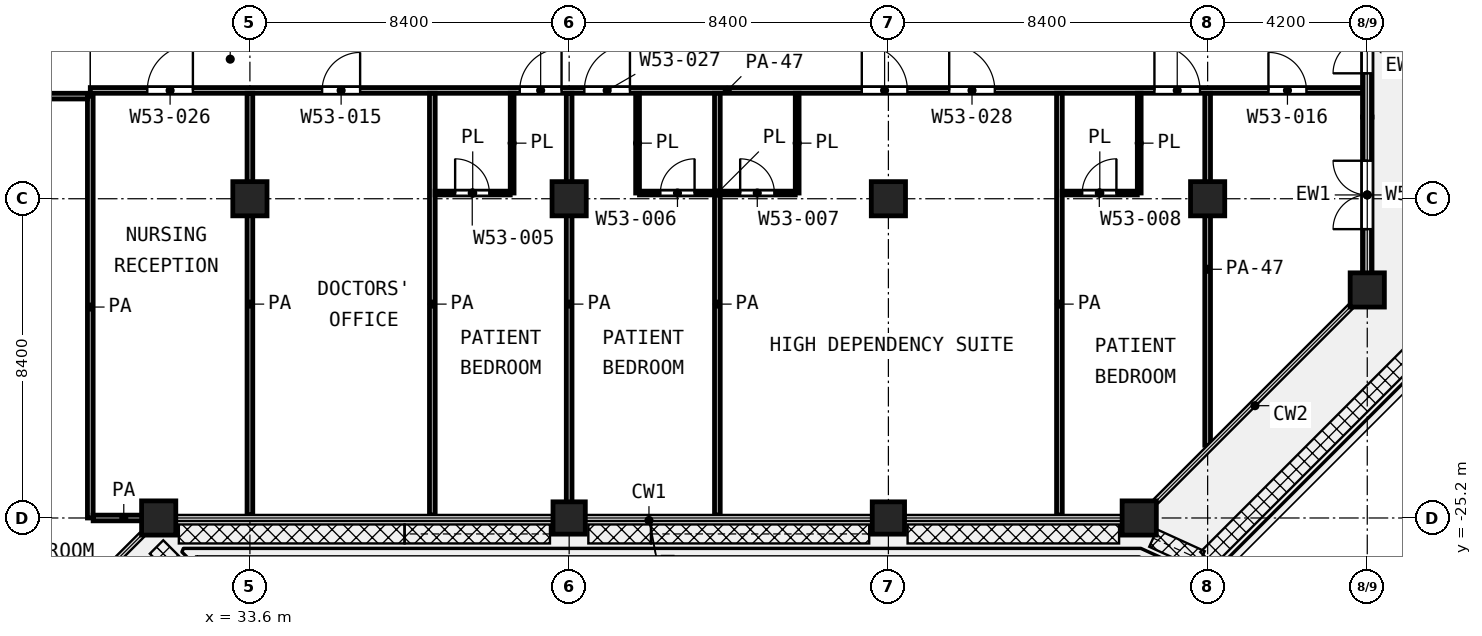
"""IFC4 building model, lengths in metres.
Left out: names, types, materials, properties, quantities, classifications, styles, units other than length and angle.
Written with IfcOpenShell. Run it as: python <this file> out.ifc"""

import sys

from ifc_helpers import new_model, si_unit, direction, frame, frame_2d, origin, origin_2d, place, context, subcontext, project, spatial, rectangle, extrude, element, fill, save


model = new_model("IFC4")
c1 = context("Model", 3, precision=1e-05, world=origin(), true_north=direction((0.0, 1.0)))
c2 = subcontext(c1, "Body", "Model", "MODEL_VIEW")
j1 = project(units=[si_unit("LENGTHUNIT", "METRE"), si_unit("PLANEANGLEUNIT", "RADIAN")], contexts=[c1])
p1 = place(None, origin())
s1 = spatial("IfcSite", under=j1, at=p1, CompositionType="ELEMENT")
p2 = place(p1, origin())
s2 = spatial("IfcBuilding", under=s1, at=p2, CompositionType="ELEMENT")
p3 = place(p2, frame((0.0, 0.0, 251.6)))
s3 = spatial("IfcBuildingStorey", under=s2, at=p3, CompositionType="ELEMENT", Elevation=251.6)
for number, where, z_axis, x_axis in (
    (1, (33.6, -16.8, 0.0), (0.0, 0.0, 1.0), (1.0, 0.0, 0.0)),
    (2, (42.0, -16.8, 0.0), (0.0, 0.0, 1.0), (1.0, 0.0, 0.0)),
    (3, (50.4, -16.8, 0.0), (0.0, 0.0, 1.0), (1.0, 0.0, 0.0)),
    (4, (58.8, -16.8, 0.0), (0.0, 0.0, 1.0), (1.0, 0.0, 0.0)),
    (5, (63.0, -19.2, 0.0), (0.0, 0.0, 1.0), (1.0, 0.0, 0.0)),
    (6, (31.2, -25.2, 0.0), (0.0, 0.0, 1.0), (1.0, 0.0, 0.0)),
):
    element("IfcColumn", number, at=place(p3, frame(where, z_axis=z_axis, x_axis=x_axis)), inside=s3, PredefinedType="COLUMN", context=c2, shape_type="SweptSolid", body=[
        extrude(rectangle(XDim=0.9, YDim=0.9, at=origin_2d()), origin(), (0.0, 0.0, 1.0), 4.2),
    ])
for number, where, z_axis, x_axis in (
    (7, (42.0, -25.2, 0.0), (0.0, 0.0, 1.0), (1.0, 0.0, 0.0)),
    (8, (50.4, -25.2, 0.0), (0.0, 0.0, 1.0), (1.0, 0.0, 0.0)),
):
    element("IfcColumn", number, at=place(p3, frame(where, z_axis=z_axis, x_axis=x_axis)), inside=s3, PredefinedType="COLUMN", context=c2, shape_type="SweptSolid", body=[
        extrude(rectangle(XDim=0.85, YDim=0.85, at=origin_2d()), origin(), (0.0, 0.0, 1.0), 4.2),
    ])
p4 = place(p3, frame((57.0, -25.2, 0.0), z_axis=(0.0, 0.0, 1.0), x_axis=(1.0, 0.0, 0.0)))
e9 = element("IfcColumn", 9, at=p4, inside=s3, PredefinedType="COLUMN", context=c2, shape_type="SweptSolid", body=[
    extrude(rectangle(XDim=0.9, YDim=0.9, at=origin_2d()), origin(), (0.0, 0.0, 1.0), 4.2),
])
p5 = place(p3, frame((63.0, -18.75, 0.0), z_axis=(0.0, 0.0, 1.0), x_axis=(0.0, 1.0, 0.0)))
e10 = element("IfcWall", 10, at=p5, inside=s3, PredefinedType="SOLIDWALL", context=c2, shape_type="SweptSolid", body=[
    extrude(rectangle(XDim=4.1, YDim=0.25, at=frame_2d((2.05, 0.0))), origin(), (0.0, 0.0, 1.0), 2.58),
])
p6 = place(p5, frame((1.15, 0.0, 0.0)))
e11 = element("IfcOpeningElement", 11, at=p6, cuts=e10, PredefinedType="OPENING", context=c2, shape_type="SweptSolid", body=[
    extrude(rectangle(XDim=1.8, YDim=2.1, at=frame_2d((0.9, 1.05))), frame((0.0, 0.135, 0.0), z_axis=(0.0, -1.0, 0.0), x_axis=(1.0, 0.0, 0.0)), (0.0, 0.0, 1.0), 0.27),
])
p7 = place(p3, frame((63.0, -14.65, 0.0), z_axis=(0.0, 0.0, 1.0), x_axis=(0.0, 1.0, 0.0)))
e12 = element("IfcWall", 12, at=p7, inside=s3, PredefinedType="SOLIDWALL", context=c2, shape_type="SweptSolid", body=[
    extrude(rectangle(XDim=4.1, YDim=0.25, at=frame_2d((2.05, 0.0))), origin(), (0.0, 0.0, 1.0), 2.58),
])
p8 = place(p7, frame((1.15, 0.0, 0.0)))
e13 = element("IfcOpeningElement", 13, at=p8, cuts=e12, PredefinedType="OPENING", context=c2, shape_type="SweptSolid", body=[
    extrude(rectangle(XDim=1.8, YDim=2.1, at=frame_2d((0.9, 1.05))), frame((0.0, 0.135, 0.0), z_axis=(0.0, -1.0, 0.0), x_axis=(1.0, 0.0, 0.0)), (0.0, 0.0, 1.0), 0.27),
])
p9 = place(p3, frame((38.475, -16.65, 0.0), z_axis=(0.0, 0.0, 1.0), x_axis=(1.0, 0.0, 0.0)))
e14 = element("IfcWall", 14, at=p9, inside=s3, PredefinedType="PARTITIONING", context=c2, shape_type="SweptSolid", body=[
    extrude(rectangle(XDim=1.975, YDim=0.1, at=frame_2d((0.987, 0.0))), origin(), (0.0, 0.0, 1.0), 3.6),
])
p10 = place(p9, frame((0.525, 0.0, 0.0)))
e15 = element("IfcOpeningElement", 15, at=p10, cuts=e14, PredefinedType="OPENING", context=c2, shape_type="SweptSolid", body=[
    extrude(rectangle(XDim=0.9, YDim=2.1, at=frame_2d((0.45, 1.05))), frame((0.0, 0.06, 0.0), z_axis=(0.0, -1.0, 0.0), x_axis=(1.0, 0.0, 0.0)), (0.0, 0.0, 1.0), 0.12),
])
p11 = place(p3, frame((43.85, -16.65, 0.0), z_axis=(0.0, 0.0, 1.0), x_axis=(1.0, 0.0, 0.0)))
e16 = element("IfcWall", 16, at=p11, inside=s3, PredefinedType="PARTITIONING", context=c2, shape_type="SweptSolid", body=[
    extrude(rectangle(XDim=4.1, YDim=0.1, at=frame_2d((2.05, 0.0))), origin(), (0.0, 0.0, 1.0), 3.6),
])
p12 = place(p11, frame((0.55, 0.0, 0.0)))
e17 = element("IfcOpeningElement", 17, at=p12, cuts=e16, PredefinedType="OPENING", context=c2, shape_type="SweptSolid", body=[
    extrude(rectangle(XDim=0.9, YDim=2.1, at=frame_2d((0.45, 1.05))), frame((0.0, 0.06, 0.0), z_axis=(0.0, -1.0, 0.0), x_axis=(1.0, 0.0, 0.0)), (0.0, 0.0, 1.0), 0.12),
])
p13 = place(p11, frame((2.65, 0.0, 0.0)))
e18 = element("IfcOpeningElement", 18, at=p13, cuts=e16, PredefinedType="OPENING", context=c2, shape_type="SweptSolid", body=[
    extrude(rectangle(XDim=0.9, YDim=2.1, at=frame_2d((0.45, 1.05))), frame((0.0, 0.06, 0.0), z_axis=(0.0, -1.0, 0.0), x_axis=(1.0, 0.0, 0.0)), (0.0, 0.0, 1.0), 0.12),
])
p14 = place(p3, frame((54.975, -16.65, 0.0), z_axis=(0.0, 0.0, 1.0), x_axis=(1.0, 0.0, 0.0)))
e19 = element("IfcWall", 19, at=p14, inside=s3, PredefinedType="PARTITIONING", context=c2, shape_type="SweptSolid", body=[
    extrude(rectangle(XDim=1.975, YDim=0.1, at=frame_2d((0.987, 0.0))), origin(), (0.0, 0.0, 1.0), 3.6),
])
p15 = place(p14, frame((0.525, 0.0, 0.0)))
e20 = element("IfcOpeningElement", 20, at=p15, cuts=e19, PredefinedType="OPENING", context=c2, shape_type="SweptSolid", body=[
    extrude(rectangle(XDim=0.9, YDim=2.1, at=frame_2d((0.45, 1.05))), frame((0.0, 0.06, 0.0), z_axis=(0.0, -1.0, 0.0), x_axis=(1.0, 0.0, 0.0)), (0.0, 0.0, 1.0), 0.12),
])
for number, where, z_axis, x_axis in (
    (21, (40.5, -16.65, 0.0), (0.0, 0.0, 1.0), (0.0, 1.0, 0.0)),
    (22, (43.8, -16.65, 0.0), (0.0, 0.0, 1.0), (0.0, 1.0, 0.0)),
    (23, (48.0, -16.65, 0.0), (0.0, 0.0, 1.0), (0.0, 1.0, 0.0)),
    (24, (57.0, -16.65, 0.0), (0.0, 0.0, 1.0), (0.0, 1.0, 0.0)),
):
    element("IfcWall", number, at=place(p3, frame(where, z_axis=z_axis, x_axis=x_axis)), inside=s3, PredefinedType="PARTITIONING", context=c2, shape_type="SweptSolid", body=[
        extrude(rectangle(XDim=2.625, YDim=0.1, at=frame_2d((1.312, 0.0))), origin(), (0.0, 0.0, 1.0), 3.6),
    ])
p16 = place(p3, frame((29.475, -25.2, 0.0), z_axis=(0.0, 0.0, 1.0), x_axis=(1.0, 0.0, 0.0)))
e25 = element("IfcWall", 25, at=p16, inside=s3, PredefinedType="PARTITIONING", context=c2, shape_type="SweptSolid", body=[
    extrude(rectangle(XDim=1.612, YDim=0.15, at=frame_2d((0.806, 0.0))), origin(), (0.0, 0.0, 1.0), 3.6),
])
p17 = place(p3, frame((24.8, -14.1, 0.0), z_axis=(0.0, 0.0, 1.0), x_axis=(1.0, 0.0, 0.0)))
e26 = element("IfcWall", 26, at=p17, inside=s3, PredefinedType="PARTITIONING", context=c2, shape_type="SweptSolid", body=[
    extrude(rectangle(XDim=4.525, YDim=0.15, at=frame_2d((2.262, 0.0))), origin(), (0.0, 0.0, 1.0), 3.6),
])
p18 = place(p17, frame((1.75, 0.0, 0.0)))
e27 = element("IfcOpeningElement", 27, at=p18, cuts=e26, PredefinedType="OPENING", context=c2, shape_type="SweptSolid", body=[
    extrude(rectangle(XDim=1.5, YDim=2.1, at=frame_2d((0.75, 1.05))), frame((0.0, 0.085, 0.0), z_axis=(0.0, -1.0, 0.0), x_axis=(1.0, 0.0, 0.0)), (0.0, 0.0, 1.0), 0.17),
])
p19 = place(p3, frame((29.4, -13.95, 0.0), z_axis=(0.0, 0.0, 1.0), x_axis=(1.0, 0.0, 0.0)))
e28 = element("IfcWall", 28, at=p19, inside=s3, PredefinedType="PARTITIONING", context=c2, shape_type="SweptSolid", body=[
    extrude(rectangle(XDim=33.52, YDim=0.15, at=frame_2d((16.76, 0.0))), origin(), (0.0, 0.0, 1.0), 2.7),
])
p20 = place(p19, frame((1.5, 0.0, 0.0)))
e29 = element("IfcOpeningElement", 29, at=p20, cuts=e28, PredefinedType="OPENING", context=c2, shape_type="SweptSolid", body=[
    extrude(rectangle(XDim=1.2, YDim=2.1, at=frame_2d((0.6, 1.05))), frame((0.0, 0.085, 0.0), z_axis=(0.0, -1.0, 0.0), x_axis=(1.0, 0.0, 0.0)), (0.0, 0.0, 1.0), 0.17),
])
p21 = place(p19, frame((6.1, 0.0, 0.0)))
e30 = element("IfcOpeningElement", 30, at=p21, cuts=e28, PredefinedType="OPENING", context=c2, shape_type="SweptSolid", body=[
    extrude(rectangle(XDim=1.0, YDim=2.1, at=frame_2d((0.5, 1.05))), frame((0.0, 0.085, 0.0), z_axis=(0.0, -1.0, 0.0), x_axis=(1.0, 0.0, 0.0)), (0.0, 0.0, 1.0), 0.17),
])
p22 = place(p19, frame((11.3, 0.0, 0.0)))
e31 = element("IfcOpeningElement", 31, at=p22, cuts=e28, PredefinedType="OPENING", context=c2, shape_type="SweptSolid", body=[
    extrude(rectangle(XDim=1.1, YDim=2.1, at=frame_2d((0.55, 1.05))), frame((0.0, 0.085, 0.0), z_axis=(0.0, -1.0, 0.0), x_axis=(1.0, 0.0, 0.0)), (0.0, 0.0, 1.0), 0.17),
])
p23 = place(p19, frame((13.0, 0.0, 0.0)))
e32 = element("IfcOpeningElement", 32, at=p23, cuts=e28, PredefinedType="OPENING", context=c2, shape_type="SweptSolid", body=[
    extrude(rectangle(XDim=1.2, YDim=2.1, at=frame_2d((0.6, 1.05))), frame((0.0, 0.085, 0.0), z_axis=(0.0, -1.0, 0.0), x_axis=(1.0, 0.0, 0.0)), (0.0, 0.0, 1.0), 0.17),
])
p24 = place(p19, frame((22.6, 0.0, 0.0)))
e33 = element("IfcOpeningElement", 33, at=p24, cuts=e28, PredefinedType="OPENING", context=c2, shape_type="SweptSolid", body=[
    extrude(rectangle(XDim=1.2, YDim=2.1, at=frame_2d((0.6, 1.05))), frame((0.0, 0.085, 0.0), z_axis=(0.0, -1.0, 0.0), x_axis=(1.0, 0.0, 0.0)), (0.0, 0.0, 1.0), 0.17),
])
p25 = place(p19, frame((20.3, 0.0, 0.0)))
e34 = element("IfcOpeningElement", 34, at=p25, cuts=e28, PredefinedType="OPENING", context=c2, shape_type="SweptSolid", body=[
    extrude(rectangle(XDim=1.2, YDim=2.1, at=frame_2d((0.6, 1.05))), frame((0.0, 0.085, 0.0), z_axis=(0.0, -1.0, 0.0), x_axis=(1.0, 0.0, 0.0)), (0.0, 0.0, 1.0), 0.17),
])
p26 = place(p19, frame((28.0, 0.0, 0.0)))
e35 = element("IfcOpeningElement", 35, at=p26, cuts=e28, PredefinedType="OPENING", context=c2, shape_type="SweptSolid", body=[
    extrude(rectangle(XDim=1.2, YDim=2.1, at=frame_2d((0.6, 1.05))), frame((0.0, 0.085, 0.0), z_axis=(0.0, -1.0, 0.0), x_axis=(1.0, 0.0, 0.0)), (0.0, 0.0, 1.0), 0.17),
])
p27 = place(p19, frame((31.0, 0.0, 0.0)))
e36 = element("IfcOpeningElement", 36, at=p27, cuts=e28, PredefinedType="OPENING", context=c2, shape_type="SweptSolid", body=[
    extrude(rectangle(XDim=1.0, YDim=2.1, at=frame_2d((0.5, 1.05))), frame((0.0, 0.085, 0.0), z_axis=(0.0, -1.0, 0.0), x_axis=(1.0, 0.0, 0.0)), (0.0, 0.0, 1.0), 0.17),
])
p28 = place(p3, frame((29.4, -25.2, 0.0), z_axis=(0.0, 0.0, 1.0), x_axis=(0.0, 1.0, 0.0)))
e37 = element("IfcWall", 37, at=p28, inside=s3, PredefinedType="PARTITIONING", context=c2, shape_type="SweptSolid", body=[
    extrude(rectangle(XDim=11.1, YDim=0.15, at=frame_2d((5.55, 0.0))), origin(), (0.0, 0.0, 1.0), 3.6),
])
for number, where, z_axis, x_axis in (
    (38, (33.6, -25.12, 0.0), (0.0, 0.0, 1.0), (0.0, 1.0, 0.0)),
    (39, (38.4, -25.12, 0.0), (0.0, 0.0, 1.0), (0.0, 1.0, 0.0)),
    (40, (42.0, -25.12, 0.0), (0.0, 0.0, 1.0), (0.0, 1.0, 0.0)),
    (41, (45.9, -25.12, 0.0), (0.0, 0.0, 1.0), (0.0, 1.0, 0.0)),
    (42, (54.9, -25.12, 0.0), (0.0, 0.0, 1.0), (0.0, 1.0, 0.0)),
):
    element("IfcWall", number, at=place(p3, frame(where, z_axis=z_axis, x_axis=x_axis)), inside=s3, PredefinedType="PARTITIONING", context=c2, shape_type="SweptSolid", body=[
        extrude(rectangle(XDim=11.095, YDim=0.15, at=frame_2d((5.548, 0.0))), origin(), (0.0, 0.0, 1.0), 3.6),
    ])
p29 = place(p3, frame((58.8, -23.287, 0.0), z_axis=(0.0, 0.0, 1.0), x_axis=(0.0, 1.0, 0.0)))
e43 = element("IfcWall", 43, at=p29, inside=s3, PredefinedType="PARTITIONING", context=c2, shape_type="SweptSolid", body=[
    extrude(rectangle(XDim=9.262, YDim=0.15, at=frame_2d((4.631, 0.0))), origin(), (0.0, 0.0, 1.0), 2.7),
])
p30 = place(p6, origin())
e44 = element("IfcDoor", 44, at=p30, inside=s3, OperationType="DOUBLE_DOOR_SINGLE_SWING", PredefinedType="DOOR", context=c2, shape_type="SweptSolid", body=[
    extrude(rectangle(XDim=1.8, YDim=2.1, at=frame_2d((0.9, 1.05))), frame((0.0, 0.025, 0.0), z_axis=(0.0, -1.0, 0.0), x_axis=(1.0, 0.0, 0.0)), (0.0, 0.0, 1.0), 0.05),
])
fill(e11, e44)
p31 = place(p8, origin())
e45 = element("IfcDoor", 45, at=p31, inside=s3, OperationType="DOUBLE_DOOR_SINGLE_SWING", PredefinedType="DOOR", context=c2, shape_type="SweptSolid", body=[
    extrude(rectangle(XDim=1.8, YDim=2.1, at=frame_2d((0.9, 1.05))), frame((0.0, 0.025, 0.0), z_axis=(0.0, -1.0, 0.0), x_axis=(1.0, 0.0, 0.0)), (0.0, 0.0, 1.0), 0.05),
])
fill(e13, e45)
p32 = place(p20, origin())
e46 = element("IfcDoor", 46, at=p32, inside=s3, OperationType="SINGLE_SWING_RIGHT", PredefinedType="DOOR", context=c2, shape_type="SweptSolid", body=[
    extrude(rectangle(XDim=1.2, YDim=2.1, at=frame_2d((0.6, 1.05))), frame((0.0, 0.025, 0.0), z_axis=(0.0, -1.0, 0.0), x_axis=(1.0, 0.0, 0.0)), (0.0, 0.0, 1.0), 0.05),
])
fill(e29, e46)
p33 = place(p21, origin())
e47 = element("IfcDoor", 47, at=p33, inside=s3, OperationType="SINGLE_SWING_RIGHT", PredefinedType="DOOR", context=c2, shape_type="SweptSolid", body=[
    extrude(rectangle(XDim=1.0, YDim=2.1, at=frame_2d((0.5, 1.05))), frame((0.0, 0.025, 0.0), z_axis=(0.0, -1.0, 0.0), x_axis=(1.0, 0.0, 0.0)), (0.0, 0.0, 1.0), 0.05),
])
fill(e30, e47)
p34 = place(p22, origin())
e48 = element("IfcDoor", 48, at=p34, inside=s3, OperationType="SINGLE_SWING_RIGHT", PredefinedType="DOOR", context=c2, shape_type="SweptSolid", body=[
    extrude(rectangle(XDim=1.1, YDim=2.1, at=frame_2d((0.55, 1.05))), frame((0.0, 0.025, 0.0), z_axis=(0.0, -1.0, 0.0), x_axis=(1.0, 0.0, 0.0)), (0.0, 0.0, 1.0), 0.05),
])
fill(e31, e48)
p35 = place(p10, origin())
e49 = element("IfcDoor", 49, at=p35, inside=s3, OperationType="SINGLE_SWING_LEFT", PredefinedType="DOOR", context=c2, shape_type="SweptSolid", body=[
    extrude(rectangle(XDim=0.9, YDim=2.1, at=frame_2d((0.45, 1.05))), frame((0.0, 0.025, 0.0), z_axis=(0.0, -1.0, 0.0), x_axis=(1.0, 0.0, 0.0)), (0.0, 0.0, 1.0), 0.05),
])
fill(e15, e49)
p36 = place(p23, origin())
e50 = element("IfcDoor", 50, at=p36, inside=s3, OperationType="SINGLE_SWING_RIGHT", PredefinedType="DOOR", context=c2, shape_type="SweptSolid", body=[
    extrude(rectangle(XDim=1.2, YDim=2.1, at=frame_2d((0.6, 1.05))), frame((0.0, 0.025, 0.0), z_axis=(0.0, -1.0, 0.0), x_axis=(1.0, 0.0, 0.0)), (0.0, 0.0, 1.0), 0.05),
])
fill(e32, e50)
p37 = place(p12, origin())
e51 = element("IfcDoor", 51, at=p37, inside=s3, OperationType="SINGLE_SWING_RIGHT", PredefinedType="DOOR", context=c2, shape_type="SweptSolid", body=[
    extrude(rectangle(XDim=0.9, YDim=2.1, at=frame_2d((0.45, 1.05))), frame((0.0, 0.025, 0.0), z_axis=(0.0, -1.0, 0.0), x_axis=(1.0, 0.0, 0.0)), (0.0, 0.0, 1.0), 0.05),
])
fill(e17, e51)
p38 = place(p24, origin())
e52 = element("IfcDoor", 52, at=p38, inside=s3, OperationType="SINGLE_SWING_LEFT", PredefinedType="DOOR", context=c2, shape_type="SweptSolid", body=[
    extrude(rectangle(XDim=1.2, YDim=2.1, at=frame_2d((0.6, 1.05))), frame((0.0, 0.025, 0.0), z_axis=(0.0, -1.0, 0.0), x_axis=(1.0, 0.0, 0.0)), (0.0, 0.0, 1.0), 0.05),
])
fill(e33, e52)
p39 = place(p25, origin())
e53 = element("IfcDoor", 53, at=p39, inside=s3, OperationType="SINGLE_SWING_LEFT", PredefinedType="DOOR", context=c2, shape_type="SweptSolid", body=[
    extrude(rectangle(XDim=1.2, YDim=2.1, at=frame_2d((0.6, 1.05))), frame((0.0, 0.025, 0.0), z_axis=(0.0, -1.0, 0.0), x_axis=(1.0, 0.0, 0.0)), (0.0, 0.0, 1.0), 0.05),
])
fill(e34, e53)
p40 = place(p13, origin())
e54 = element("IfcDoor", 54, at=p40, inside=s3, OperationType="SINGLE_SWING_LEFT", PredefinedType="DOOR", context=c2, shape_type="SweptSolid", body=[
    extrude(rectangle(XDim=0.9, YDim=2.1, at=frame_2d((0.45, 1.05))), frame((0.0, 0.025, 0.0), z_axis=(0.0, -1.0, 0.0), x_axis=(1.0, 0.0, 0.0)), (0.0, 0.0, 1.0), 0.05),
])
fill(e18, e54)
p41 = place(p26, origin())
e55 = element("IfcDoor", 55, at=p41, inside=s3, OperationType="SINGLE_SWING_LEFT", PredefinedType="DOOR", context=c2, shape_type="SweptSolid", body=[
    extrude(rectangle(XDim=1.2, YDim=2.1, at=frame_2d((0.6, 1.05))), frame((0.0, 0.025, 0.0), z_axis=(0.0, -1.0, 0.0), x_axis=(1.0, 0.0, 0.0)), (0.0, 0.0, 1.0), 0.05),
])
fill(e35, e55)
p42 = place(p15, origin())
e56 = element("IfcDoor", 56, at=p42, inside=s3, OperationType="SINGLE_SWING_RIGHT", PredefinedType="DOOR", context=c2, shape_type="SweptSolid", body=[
    extrude(rectangle(XDim=0.9, YDim=2.1, at=frame_2d((0.45, 1.05))), frame((0.0, 0.025, 0.0), z_axis=(0.0, -1.0, 0.0), x_axis=(1.0, 0.0, 0.0)), (0.0, 0.0, 1.0), 0.05),
])
fill(e20, e56)
p43 = place(p27, origin())
e57 = element("IfcDoor", 57, at=p43, inside=s3, OperationType="SINGLE_SWING_LEFT", PredefinedType="DOOR", context=c2, shape_type="SweptSolid", body=[
    extrude(rectangle(XDim=1.0, YDim=2.1, at=frame_2d((0.5, 1.05))), frame((0.0, 0.025, 0.0), z_axis=(0.0, -1.0, 0.0), x_axis=(1.0, 0.0, 0.0)), (0.0, 0.0, 1.0), 0.05),
])
fill(e36, e57)
save(model, sys.argv[1])
